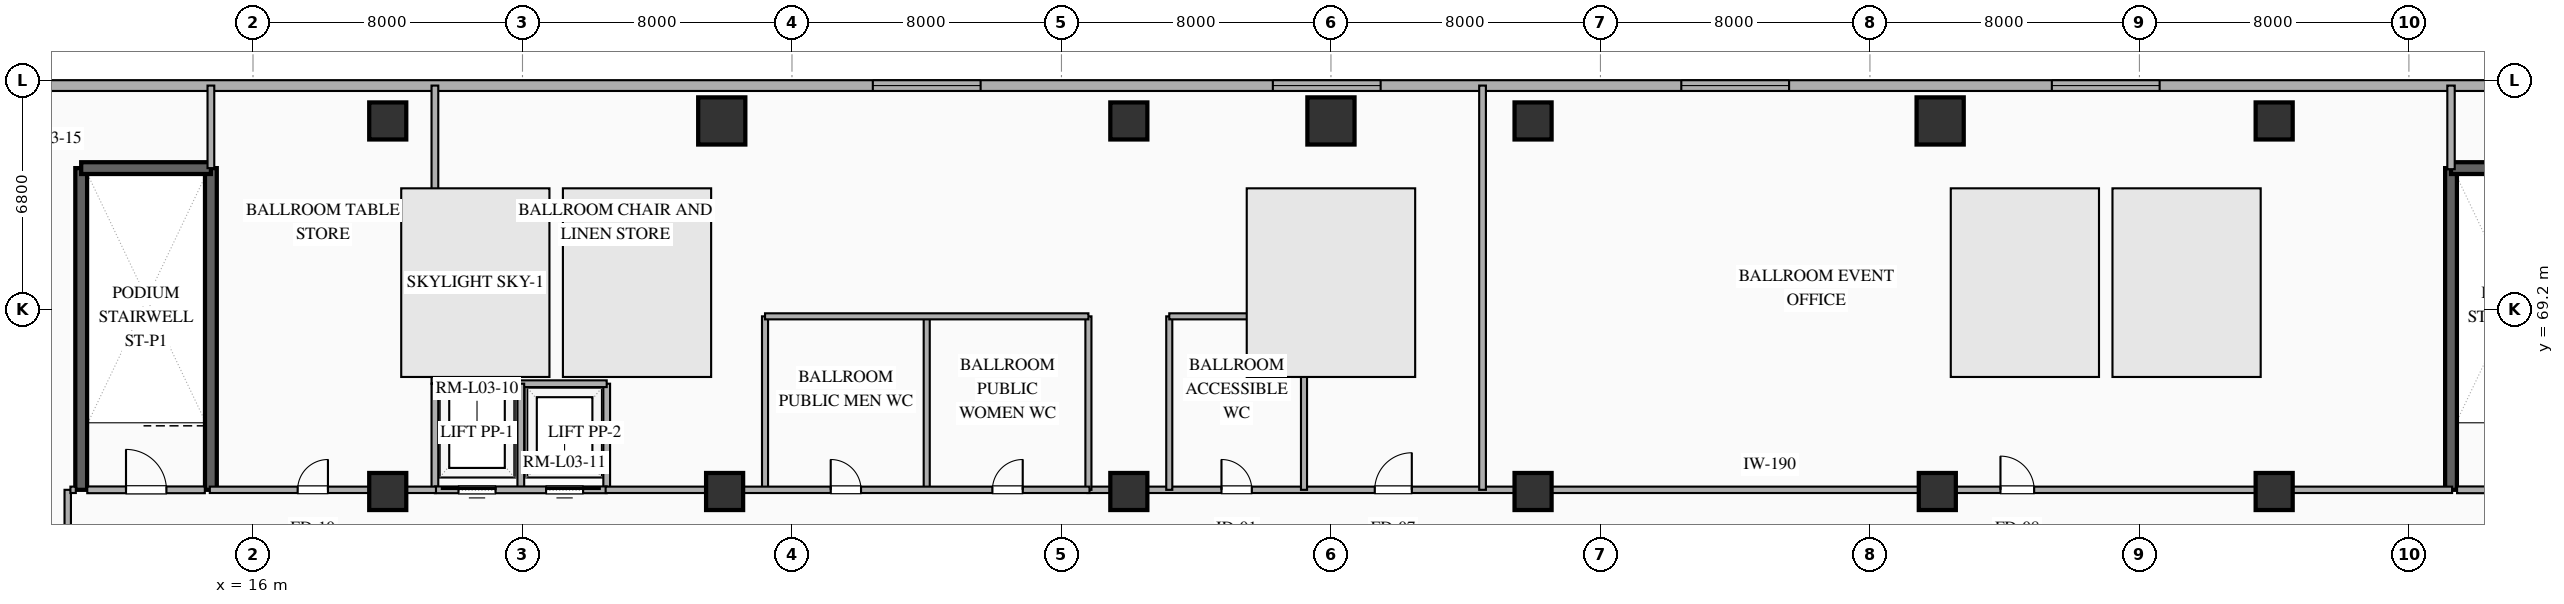
"""IFC4 building model, lengths in metres.
Left out: names, types, materials, properties, quantities, classifications, styles, units other than length and angle.
Written with IfcOpenShell. Run it as: python <this file> out.ifc"""

import sys

from ifc_helpers import new_model, si_unit, direction, frame, frame_2d, origin, origin_2d, place, context, subcontext, project, spatial, rectangle, extrude, element, fill, save


model = new_model("IFC4")
c1 = context("Model", 3, precision=1e-05, world=origin(), true_north=direction((0.0, 1.0)))
c2 = subcontext(c1, "Body", "Model", "MODEL_VIEW")
j1 = project(units=[si_unit("LENGTHUNIT", "METRE"), si_unit("PLANEANGLEUNIT", "RADIAN")], contexts=[c1])
p1 = place(None, origin())
s1 = spatial("IfcSite", under=j1, at=p1, CompositionType="ELEMENT")
p2 = place(p1, origin())
s2 = spatial("IfcBuilding", under=s1, at=p2, CompositionType="ELEMENT")
p3 = place(p2, frame((0.0, 0.0, 16.8)))
s3 = spatial("IfcBuildingStorey", under=s2, at=p3, CompositionType="ELEMENT", Elevation=16.8)
for number, where, z_axis, x_axis in (
    (1, (20.0, 74.8, 0.0), (0.0, 0.0, 1.0), (1.0, 0.0, 0.0)),
    (2, (20.0, 63.8, 0.0), (0.0, 0.0, 1.0), (1.0, 0.0, 0.0)),
    (3, (30.0, 63.8, 0.0), (0.0, 0.0, 1.0), (1.0, 0.0, 0.0)),
    (4, (42.0, 74.8, 0.0), (0.0, 0.0, 1.0), (1.0, 0.0, 0.0)),
    (5, (42.0, 63.8, 0.0), (0.0, 0.0, 1.0), (1.0, 0.0, 0.0)),
    (6, (54.0, 74.8, 0.0), (0.0, 0.0, 1.0), (1.0, 0.0, 0.0)),
    (7, (54.0, 63.8, 0.0), (0.0, 0.0, 1.0), (1.0, 0.0, 0.0)),
    (8, (66.0, 63.8, 0.0), (0.0, 0.0, 1.0), (1.0, 0.0, 0.0)),
    (9, (76.0, 74.8, 0.0), (0.0, 0.0, 1.0), (1.0, 0.0, 0.0)),
    (10, (76.0, 63.8, 0.0), (0.0, 0.0, 1.0), (1.0, 0.0, 0.0)),
):
    element("IfcColumn", number, at=place(p3, frame(where, z_axis=z_axis, x_axis=x_axis)), inside=s3, PredefinedType="COLUMN", context=c2, shape_type="SweptSolid", body=[
        extrude(rectangle(XDim=1.1, YDim=1.1, at=origin_2d()), origin(), (0.0, 0.0, 1.0), 5.05),
    ])
for number, where, z_axis, x_axis in (
    (11, (66.084, 74.8, 0.0), (0.0, 0.0, 1.0), (1.0, 0.0, 0.0)),
    (12, (48.0, 74.8, 0.0), (0.0, 0.0, 1.0), (1.0, 0.0, 0.0)),
    (13, (29.916, 74.8, 0.0), (0.0, 0.0, 1.0), (1.0, 0.0, 0.0)),
):
    element("IfcColumn", number, at=place(p3, frame(where, z_axis=z_axis, x_axis=x_axis)), inside=s3, PredefinedType="COLUMN", context=c2, shape_type="SweptSolid", body=[
        extrude(rectangle(XDim=1.4, YDim=1.4, at=origin_2d()), origin(), (0.0, 0.0, 1.0), 5.05),
    ])
for number, where, z_axis, x_axis in (
    (14, (10.9, 63.85, 0.0), (0.0, 0.0, 1.0), (0.0, 1.0, 0.0)),
    (15, (14.75, 63.85, 0.0), (0.0, 0.0, 1.0), (0.0, 1.0, 0.0)),
):
    element("IfcWall", number, at=place(p3, frame(where, z_axis=z_axis, x_axis=x_axis)), inside=s3, PredefinedType="SHEAR", context=c2, shape_type="SweptSolid", body=[
        extrude(rectangle(XDim=9.55, YDim=0.35, at=frame_2d((4.775, 0.0))), origin(), (0.0, 0.0, 1.0), 5.05),
    ])
p4 = place(p3, frame((10.9, 73.4, 0.0), z_axis=(0.0, 0.0, 1.0), x_axis=(1.0, 0.0, 0.0)))
e16 = element("IfcWall", 16, at=p4, inside=s3, PredefinedType="SHEAR", context=c2, shape_type="SweptSolid", body=[
    extrude(rectangle(XDim=3.85, YDim=0.35, at=frame_2d((1.925, 0.0))), origin(), (0.0, 0.0, 1.0), 5.05),
])
p5 = place(p3, frame((81.25, 63.85, 0.0), z_axis=(0.0, 0.0, 1.0), x_axis=(0.0, 1.0, 0.0)))
e17 = element("IfcWall", 17, at=p5, inside=s3, PredefinedType="SHEAR", context=c2, shape_type="SweptSolid", body=[
    extrude(rectangle(XDim=9.55, YDim=0.35, at=frame_2d((4.775, 0.0))), origin(), (0.0, 0.0, 1.0), 5.05),
])
p6 = place(p3, frame((81.25, 73.4, 0.0), z_axis=(0.0, 0.0, 1.0), x_axis=(1.0, 0.0, 0.0)))
e18 = element("IfcWall", 18, at=p6, inside=s3, PredefinedType="SHEAR", context=c2, shape_type="SweptSolid", body=[
    extrude(rectangle(XDim=3.8, YDim=0.35, at=frame_2d((1.9, 0.0))), origin(), (0.0, 0.0, 1.0), 5.05),
])
p7 = place(p3, frame((86.35, 75.85, 0.0), z_axis=(0.0, 0.0, 1.0), x_axis=(-1.0, 0.0, 0.0)))
e19 = element("IfcWall", 19, at=p7, inside=s3, PredefinedType="SOLIDWALL", context=c2, shape_type="SweptSolid", body=[
    extrude(rectangle(XDim=76.7, YDim=0.32, at=frame_2d((38.35, 0.0))), origin(), (0.0, 0.0, 1.0), 5.05),
])
p8 = place(p7, frame((13.75, 0.0, 0.9)))
e20 = element("IfcOpeningElement", 20, at=p8, cuts=e19, PredefinedType="OPENING", context=c2, shape_type="SweptSolid", body=[
    extrude(rectangle(XDim=3.2, YDim=3.95, at=frame_2d((1.6, 1.975))), frame((0.0, 0.17, 0.0), z_axis=(0.0, -1.0, 0.0), x_axis=(1.0, 0.0, 0.0)), (0.0, 0.0, 1.0), 0.34),
])
p9 = place(p7, frame((24.75, 0.0, 0.9)))
e21 = element("IfcOpeningElement", 21, at=p9, cuts=e19, PredefinedType="OPENING", context=c2, shape_type="SweptSolid", body=[
    extrude(rectangle(XDim=3.2, YDim=3.95, at=frame_2d((1.6, 1.975))), frame((0.0, 0.17, 0.0), z_axis=(0.0, -1.0, 0.0), x_axis=(1.0, 0.0, 0.0)), (0.0, 0.0, 1.0), 0.34),
])
p10 = place(p7, frame((36.875, 0.0, 0.9)))
e22 = element("IfcOpeningElement", 22, at=p10, cuts=e19, PredefinedType="OPENING", context=c2, shape_type="SweptSolid", body=[
    extrude(rectangle(XDim=3.2, YDim=3.95, at=frame_2d((1.6, 1.975))), frame((0.0, 0.17, 0.0), z_axis=(0.0, -1.0, 0.0), x_axis=(1.0, 0.0, 0.0)), (0.0, 0.0, 1.0), 0.34),
])
p11 = place(p7, frame((48.75, 0.0, 0.9)))
e23 = element("IfcOpeningElement", 23, at=p11, cuts=e19, PredefinedType="OPENING", context=c2, shape_type="SweptSolid", body=[
    extrude(rectangle(XDim=3.2, YDim=3.95, at=frame_2d((1.6, 1.975))), frame((0.0, 0.17, 0.0), z_axis=(0.0, -1.0, 0.0), x_axis=(1.0, 0.0, 0.0)), (0.0, 0.0, 1.0), 0.34),
])
p12 = place(p3, frame((11.08, 63.85, 0.0), z_axis=(0.0, 0.0, 1.0), x_axis=(1.0, 0.0, 0.0)))
e24 = element("IfcWall", 24, at=p12, inside=s3, PredefinedType="SOLIDWALL", context=c2, shape_type="SweptSolid", body=[
    extrude(rectangle(XDim=3.49, YDim=0.2, at=frame_2d((1.745, 0.0))), origin(), (0.0, 0.0, 1.0), 3.65),
])
p13 = place(p12, frame((1.15, 0.0, 0.0)))
e25 = element("IfcOpeningElement", 25, at=p13, cuts=e24, PredefinedType="OPENING", context=c2, shape_type="SweptSolid", body=[
    extrude(rectangle(XDim=1.2, YDim=2.15, at=frame_2d((0.6, 1.075))), frame((0.0, 0.11, 0.0), z_axis=(0.0, -1.0, 0.0), x_axis=(1.0, 0.0, 0.0)), (0.0, 0.0, 1.0), 0.22),
])
p14 = place(p3, frame((81.43, 63.85, 0.0), z_axis=(0.0, 0.0, 1.0), x_axis=(1.0, 0.0, 0.0)))
e26 = element("IfcWall", 26, at=p14, inside=s3, PredefinedType="SOLIDWALL", context=c2, shape_type="SweptSolid", body=[
    extrude(rectangle(XDim=3.44, YDim=0.2, at=frame_2d((1.72, 0.0))), origin(), (0.0, 0.0, 1.0), 3.65),
])
p15 = place(p14, frame((1.12, 0.0, 0.0)))
e27 = element("IfcOpeningElement", 27, at=p15, cuts=e26, PredefinedType="OPENING", context=c2, shape_type="SweptSolid", body=[
    extrude(rectangle(XDim=1.2, YDim=2.15, at=frame_2d((0.6, 1.075))), frame((0.0, 0.11, 0.0), z_axis=(0.0, -1.0, 0.0), x_axis=(1.0, 0.0, 0.0)), (0.0, 0.0, 1.0), 0.22),
])
for number, where, z_axis, x_axis in (
    (28, (21.4, 63.85, 0.0), (0.0, 0.0, 1.0), (0.0, 1.0, 0.0)),
    (29, (26.5, 63.85, 0.0), (0.0, 0.0, 1.0), (0.0, 1.0, 0.0)),
):
    element("IfcWall", number, at=place(p3, frame(where, z_axis=z_axis, x_axis=x_axis)), inside=s3, PredefinedType="SOLIDWALL", context=c2, shape_type="SweptSolid", body=[
        extrude(rectangle(XDim=3.15, YDim=0.2, at=frame_2d((1.575, 0.0))), origin(), (0.0, 0.0, 1.0), 3.65),
    ])
p16 = place(p3, frame((21.4, 67.0, 0.0), z_axis=(0.0, 0.0, 1.0), x_axis=(1.0, 0.0, 0.0)))
e30 = element("IfcWall", 30, at=p16, inside=s3, PredefinedType="SOLIDWALL", context=c2, shape_type="SweptSolid", body=[
    extrude(rectangle(XDim=5.1, YDim=0.2, at=frame_2d((2.55, 0.0))), origin(), (0.0, 0.0, 1.0), 3.65),
])
p17 = place(p3, frame((23.95, 63.85, 0.0), z_axis=(0.0, 0.0, 1.0), x_axis=(0.0, 1.0, 0.0)))
e31 = element("IfcWall", 31, at=p17, inside=s3, PredefinedType="SOLIDWALL", context=c2, shape_type="SweptSolid", body=[
    extrude(rectangle(XDim=3.15, YDim=0.2, at=frame_2d((1.575, 0.0))), origin(), (0.0, 0.0, 1.0), 3.65),
])
p18 = place(p3, frame((21.4, 63.85, 0.0), z_axis=(0.0, 0.0, 1.0), x_axis=(1.0, 0.0, 0.0)))
e32 = element("IfcWall", 32, at=p18, inside=s3, PredefinedType="SOLIDWALL", context=c2, shape_type="SweptSolid", body=[
    extrude(rectangle(XDim=5.1, YDim=0.2, at=frame_2d((2.55, 0.0))), origin(), (0.0, 0.0, 1.0), 3.65),
])
p19 = place(p18, frame((0.7, 0.0, 0.0)))
e33 = element("IfcOpeningElement", 33, at=p19, cuts=e32, PredefinedType="OPENING", context=c2, shape_type="SweptSolid", body=[
    extrude(rectangle(XDim=1.1, YDim=2.2, at=frame_2d((0.55, 1.1))), frame((0.0, 0.11, 0.0), z_axis=(0.0, -1.0, 0.0), x_axis=(1.0, 0.0, 0.0)), (0.0, 0.0, 1.0), 0.22),
])
p20 = place(p18, frame((3.3, 0.0, 0.0)))
e34 = element("IfcOpeningElement", 34, at=p20, cuts=e32, PredefinedType="OPENING", context=c2, shape_type="SweptSolid", body=[
    extrude(rectangle(XDim=1.1, YDim=2.2, at=frame_2d((0.55, 1.1))), frame((0.0, 0.11, 0.0), z_axis=(0.0, -1.0, 0.0), x_axis=(1.0, 0.0, 0.0)), (0.0, 0.0, 1.0), 0.22),
])
p21 = place(p3, frame((40.768, 63.85, 0.0), z_axis=(0.0, 0.0, 1.0), x_axis=(1.0, 0.0, 0.0)))
e35 = element("IfcWall", 35, at=p21, inside=s3, PredefinedType="PARTITIONING", context=c2, shape_type="SweptSolid", body=[
    extrude(rectangle(XDim=40.514, YDim=0.19, at=frame_2d((20.257, 0.0))), origin(), (0.0, 0.0, 1.0), 3.65),
])
p22 = place(p21, frame((27.107, 0.0, 0.0)))
e36 = element("IfcOpeningElement", 36, at=p22, cuts=e35, PredefinedType="OPENING", context=c2, shape_type="SweptSolid", body=[
    extrude(rectangle(XDim=1.0, YDim=2.2, at=frame_2d((0.5, 1.1))), frame((0.0, 0.105, 0.0), z_axis=(0.0, -1.0, 0.0), x_axis=(1.0, 0.0, 0.0)), (0.0, 0.0, 1.0), 0.21),
])
p23 = place(p21, frame((8.532, 0.0, 0.0)))
e37 = element("IfcOpeningElement", 37, at=p23, cuts=e35, PredefinedType="OPENING", context=c2, shape_type="SweptSolid", body=[
    extrude(rectangle(XDim=1.1, YDim=2.2, at=frame_2d((0.55, 1.1))), frame((0.0, 0.105, 0.0), z_axis=(0.0, -1.0, 0.0), x_axis=(1.0, 0.0, 0.0)), (0.0, 0.0, 1.0), 0.21),
])
p24 = place(p21, frame((3.982, 0.0, 0.0)))
e38 = element("IfcOpeningElement", 38, at=p24, cuts=e35, PredefinedType="OPENING", context=c2, shape_type="SweptSolid", body=[
    extrude(rectangle(XDim=0.9, YDim=2.1, at=frame_2d((0.45, 1.05))), frame((0.0, 0.105, 0.0), z_axis=(0.0, -1.0, 0.0), x_axis=(1.0, 0.0, 0.0)), (0.0, 0.0, 1.0), 0.21),
])
p25 = place(p3, frame((52.5, 75.85, 0.0), z_axis=(0.0, 0.0, 1.0), x_axis=(0.0, -1.0, 0.0)))
e39 = element("IfcWall", 39, at=p25, inside=s3, PredefinedType="PARTITIONING", context=c2, shape_type="SweptSolid", body=[
    extrude(rectangle(XDim=12.0, YDim=0.2, at=frame_2d((6.0, 0.0))), origin(), (0.0, 0.0, 1.0), 3.65),
])
p26 = place(p3, frame((21.4, 67.0, 0.0), z_axis=(0.0, 0.0, 1.0), x_axis=(0.0, 1.0, 0.0)))
e40 = element("IfcWall", 40, at=p26, inside=s3, PredefinedType="PARTITIONING", context=c2, shape_type="SweptSolid", body=[
    extrude(rectangle(XDim=8.85, YDim=0.2, at=frame_2d((4.425, 0.0))), origin(), (0.0, 0.0, 1.0), 3.65),
])
p27 = place(p3, frame((14.718, 63.85, 0.0), z_axis=(0.0, 0.0, 1.0), x_axis=(1.0, 0.0, 0.0)))
e41 = element("IfcWall", 41, at=p27, inside=s3, PredefinedType="PARTITIONING", context=c2, shape_type="SweptSolid", body=[
    extrude(rectangle(XDim=6.714, YDim=0.19, at=frame_2d((3.357, 0.0))), origin(), (0.0, 0.0, 1.0), 3.65),
])
p28 = place(p27, frame((2.607, 0.0, 0.0)))
e42 = element("IfcOpeningElement", 42, at=p28, cuts=e41, PredefinedType="OPENING", context=c2, shape_type="SweptSolid", body=[
    extrude(rectangle(XDim=0.9, YDim=2.15, at=frame_2d((0.45, 1.075))), frame((0.0, 0.105, 0.0), z_axis=(0.0, -1.0, 0.0), x_axis=(1.0, 0.0, 0.0)), (0.0, 0.0, 1.0), 0.21),
])
for number, where, z_axis, x_axis in (
    (43, (36.0, 69.0, 0.0), (0.0, 0.0, 1.0), (0.0, -1.0, 0.0)),
    (44, (31.2, 63.85, 0.0), (0.0, 0.0, 1.0), (0.0, 1.0, 0.0)),
    (45, (40.8, 69.0, 0.0), (0.0, 0.0, 1.0), (0.0, -1.0, 0.0)),
    (46, (43.2, 63.85, 0.0), (0.0, 0.0, 1.0), (0.0, 1.0, 0.0)),
    (47, (47.2, 69.0, 0.0), (0.0, 0.0, 1.0), (0.0, -1.0, 0.0)),
):
    element("IfcWall", number, at=place(p3, frame(where, z_axis=z_axis, x_axis=x_axis)), inside=s3, PredefinedType="PLUMBINGWALL", context=c2, shape_type="SweptSolid", body=[
        extrude(rectangle(XDim=5.15, YDim=0.18, at=frame_2d((2.575, 0.0))), origin(), (0.0, 0.0, 1.0), 3.65),
    ])
p29 = place(p3, frame((26.468, 63.85, 0.0), z_axis=(0.0, 0.0, 1.0), x_axis=(1.0, 0.0, 0.0)))
e48 = element("IfcWall", 48, at=p29, inside=s3, PredefinedType="PARTITIONING", context=c2, shape_type="SweptSolid", body=[
    extrude(rectangle(XDim=14.364, YDim=0.19, at=frame_2d((7.182, 0.0))), origin(), (0.0, 0.0, 1.0), 3.65),
])
p30 = place(p29, frame((6.682, 0.0, 0.0)))
e49 = element("IfcOpeningElement", 49, at=p30, cuts=e48, PredefinedType="OPENING", context=c2, shape_type="SweptSolid", body=[
    extrude(rectangle(XDim=0.9, YDim=2.1, at=frame_2d((0.45, 1.05))), frame((0.0, 0.105, 0.0), z_axis=(0.0, -1.0, 0.0), x_axis=(1.0, 0.0, 0.0)), (0.0, 0.0, 1.0), 0.21),
])
p31 = place(p29, frame((11.482, 0.0, 0.0)))
e50 = element("IfcOpeningElement", 50, at=p31, cuts=e48, PredefinedType="OPENING", context=c2, shape_type="SweptSolid", body=[
    extrude(rectangle(XDim=0.9, YDim=2.1, at=frame_2d((0.45, 1.05))), frame((0.0, 0.105, 0.0), z_axis=(0.0, -1.0, 0.0), x_axis=(1.0, 0.0, 0.0)), (0.0, 0.0, 1.0), 0.21),
])
p32 = place(p3, frame((31.2, 69.0, 0.0), z_axis=(0.0, 0.0, 1.0), x_axis=(1.0, 0.0, 0.0)))
e51 = element("IfcWall", 51, at=p32, inside=s3, PredefinedType="PLUMBINGWALL", context=c2, shape_type="SweptSolid", body=[
    extrude(rectangle(XDim=9.6, YDim=0.18, at=frame_2d((4.8, 0.0))), origin(), (0.0, 0.0, 1.0), 3.65),
])
p33 = place(p3, frame((43.2, 69.0, 0.0), z_axis=(0.0, 0.0, 1.0), x_axis=(1.0, 0.0, 0.0)))
e52 = element("IfcWall", 52, at=p33, inside=s3, PredefinedType="PLUMBINGWALL", context=c2, shape_type="SweptSolid", body=[
    extrude(rectangle(XDim=4.0, YDim=0.18, at=frame_2d((2.0, 0.0))), origin(), (0.0, 0.0, 1.0), 3.65),
])
p34 = place(p3, frame((10.5, 60.8, 0.0), z_axis=(0.0, 0.0, 1.0), x_axis=(0.0, 1.0, 0.0)))
e53 = element("IfcWall", 53, at=p34, inside=s3, PredefinedType="PARTITIONING", context=c2, shape_type="SweptSolid", body=[
    extrude(rectangle(XDim=3.05, YDim=0.19, at=frame_2d((1.525, 0.0))), origin(), (0.0, 0.0, 1.0), 3.65),
])
p35 = place(p34, frame((0.8, 0.0, 0.0)))
e54 = element("IfcOpeningElement", 54, at=p35, cuts=e53, PredefinedType="OPENING", context=c2, shape_type="SweptSolid", body=[
    extrude(rectangle(XDim=0.85, YDim=2.15, at=frame_2d((0.425, 1.075))), frame((0.0, 0.105, 0.0), z_axis=(0.0, -1.0, 0.0), x_axis=(1.0, 0.0, 0.0)), (0.0, 0.0, 1.0), 0.21),
])
p36 = place(p3, frame((81.25, 75.85, 0.0), z_axis=(0.0, 0.0, 1.0), x_axis=(0.0, -1.0, 0.0)))
e55 = element("IfcWall", 55, at=p36, inside=s3, PredefinedType="SOLIDWALL", context=c2, shape_type="SweptSolid", body=[
    extrude(rectangle(XDim=2.482, YDim=0.22, at=frame_2d((1.241, 0.0))), origin(), (0.0, 0.0, 1.0), 3.65),
])
p37 = place(p3, frame((14.75, 75.85, 0.0), z_axis=(0.0, 0.0, 1.0), x_axis=(0.0, -1.0, 0.0)))
e56 = element("IfcWall", 56, at=p37, inside=s3, PredefinedType="PARTITIONING", context=c2, shape_type="SweptSolid", body=[
    extrude(rectangle(XDim=2.45, YDim=0.2, at=frame_2d((1.225, 0.0))), origin(), (0.0, 0.0, 1.0), 3.65),
])
p38 = place(p3, frame((10.58, 63.85, 0.0), z_axis=(0.0, 0.0, 1.0), x_axis=(1.0, 0.0, 0.0)))
e57 = element("IfcWall", 57, at=p38, inside=s3, PredefinedType="PARTITIONING", context=c2, shape_type="SweptSolid", body=[
    extrude(rectangle(XDim=0.16, YDim=0.19, at=frame_2d((0.08, 0.0))), origin(), (0.0, 0.0, 1.0), 3.65),
])
p39 = place(p8, origin())
e58 = element("IfcWindow", 58, at=p39, inside=s3, PartitioningType="SINGLE_PANEL", PredefinedType="WINDOW", context=c2, shape_type="SweptSolid", body=[
    extrude(rectangle(XDim=3.2, YDim=3.95, at=frame_2d((1.6, 1.975))), frame((0.0, 0.03, 0.0), z_axis=(0.0, -1.0, 0.0), x_axis=(1.0, 0.0, 0.0)), (0.0, 0.0, 1.0), 0.06),
])
fill(e20, e58)
p40 = place(p9, origin())
e59 = element("IfcWindow", 59, at=p40, inside=s3, PartitioningType="SINGLE_PANEL", PredefinedType="WINDOW", context=c2, shape_type="SweptSolid", body=[
    extrude(rectangle(XDim=3.2, YDim=3.95, at=frame_2d((1.6, 1.975))), frame((0.0, 0.03, 0.0), z_axis=(0.0, -1.0, 0.0), x_axis=(1.0, 0.0, 0.0)), (0.0, 0.0, 1.0), 0.06),
])
fill(e21, e59)
p41 = place(p10, origin())
e60 = element("IfcWindow", 60, at=p41, inside=s3, PartitioningType="SINGLE_PANEL", PredefinedType="WINDOW", context=c2, shape_type="SweptSolid", body=[
    extrude(rectangle(XDim=3.2, YDim=3.95, at=frame_2d((1.6, 1.975))), frame((0.0, 0.03, 0.0), z_axis=(0.0, -1.0, 0.0), x_axis=(1.0, 0.0, 0.0)), (0.0, 0.0, 1.0), 0.06),
])
fill(e22, e60)
p42 = place(p11, origin())
e61 = element("IfcWindow", 61, at=p42, inside=s3, PartitioningType="SINGLE_PANEL", PredefinedType="WINDOW", context=c2, shape_type="SweptSolid", body=[
    extrude(rectangle(XDim=3.2, YDim=3.95, at=frame_2d((1.6, 1.975))), frame((0.0, 0.03, 0.0), z_axis=(0.0, -1.0, 0.0), x_axis=(1.0, 0.0, 0.0)), (0.0, 0.0, 1.0), 0.06),
])
fill(e23, e61)
p43 = place(p13, origin())
e62 = element("IfcDoor", 62, at=p43, inside=s3, OperationType="SINGLE_SWING_LEFT", PredefinedType="DOOR", context=c2, shape_type="SweptSolid", body=[
    extrude(rectangle(XDim=1.2, YDim=2.15, at=frame_2d((0.6, 1.075))), frame((0.0, 0.025, 0.0), z_axis=(0.0, -1.0, 0.0), x_axis=(1.0, 0.0, 0.0)), (0.0, 0.0, 1.0), 0.05),
])
fill(e25, e62)
p44 = place(p19, origin())
e63 = element("IfcDoor", 63, at=p44, inside=s3, OperationType="SLIDING_TO_LEFT", PredefinedType="DOOR", context=c2, shape_type="SweptSolid", body=[
    extrude(rectangle(XDim=1.1, YDim=2.2, at=frame_2d((0.55, 1.1))), frame((0.0, 0.025, 0.0), z_axis=(0.0, -1.0, 0.0), x_axis=(1.0, 0.0, 0.0)), (0.0, 0.0, 1.0), 0.05),
])
fill(e33, e63)
p45 = place(p20, origin())
e64 = element("IfcDoor", 64, at=p45, inside=s3, OperationType="SLIDING_TO_RIGHT", PredefinedType="DOOR", context=c2, shape_type="SweptSolid", body=[
    extrude(rectangle(XDim=1.1, YDim=2.2, at=frame_2d((0.55, 1.1))), frame((0.0, 0.025, 0.0), z_axis=(0.0, -1.0, 0.0), x_axis=(1.0, 0.0, 0.0)), (0.0, 0.0, 1.0), 0.05),
])
fill(e34, e64)
p46 = place(p22, origin())
e65 = element("IfcDoor", 65, at=p46, inside=s3, OperationType="SINGLE_SWING_LEFT", PredefinedType="DOOR", context=c2, shape_type="SweptSolid", body=[
    extrude(rectangle(XDim=1.0, YDim=2.2, at=frame_2d((0.5, 1.1))), frame((0.0, 0.025, 0.0), z_axis=(0.0, -1.0, 0.0), x_axis=(1.0, 0.0, 0.0)), (0.0, 0.0, 1.0), 0.05),
])
fill(e36, e65)
p47 = place(p23, origin())
e66 = element("IfcDoor", 66, at=p47, inside=s3, OperationType="SINGLE_SWING_RIGHT", PredefinedType="DOOR", context=c2, shape_type="SweptSolid", body=[
    extrude(rectangle(XDim=1.1, YDim=2.2, at=frame_2d((0.55, 1.1))), frame((0.0, 0.025, 0.0), z_axis=(0.0, -1.0, 0.0), x_axis=(1.0, 0.0, 0.0)), (0.0, 0.0, 1.0), 0.05),
])
fill(e37, e66)
p48 = place(p24, origin())
e67 = element("IfcDoor", 67, at=p48, inside=s3, OperationType="SINGLE_SWING_LEFT", PredefinedType="DOOR", context=c2, shape_type="SweptSolid", body=[
    extrude(rectangle(XDim=0.9, YDim=2.1, at=frame_2d((0.45, 1.05))), frame((0.0, 0.025, 0.0), z_axis=(0.0, -1.0, 0.0), x_axis=(1.0, 0.0, 0.0)), (0.0, 0.0, 1.0), 0.05),
])
fill(e38, e67)
p49 = place(p28, origin())
e68 = element("IfcDoor", 68, at=p49, inside=s3, OperationType="SINGLE_SWING_RIGHT", PredefinedType="DOOR", context=c2, shape_type="SweptSolid", body=[
    extrude(rectangle(XDim=0.9, YDim=2.15, at=frame_2d((0.45, 1.075))), frame((0.0, 0.025, 0.0), z_axis=(0.0, -1.0, 0.0), x_axis=(1.0, 0.0, 0.0)), (0.0, 0.0, 1.0), 0.05),
])
fill(e42, e68)
p50 = place(p30, origin())
e69 = element("IfcDoor", 69, at=p50, inside=s3, OperationType="SINGLE_SWING_LEFT", PredefinedType="DOOR", context=c2, shape_type="SweptSolid", body=[
    extrude(rectangle(XDim=0.9, YDim=2.1, at=frame_2d((0.45, 1.05))), frame((0.0, 0.025, 0.0), z_axis=(0.0, -1.0, 0.0), x_axis=(1.0, 0.0, 0.0)), (0.0, 0.0, 1.0), 0.05),
])
fill(e49, e69)
p51 = place(p31, origin())
e70 = element("IfcDoor", 70, at=p51, inside=s3, OperationType="SINGLE_SWING_RIGHT", PredefinedType="DOOR", context=c2, shape_type="SweptSolid", body=[
    extrude(rectangle(XDim=0.9, YDim=2.1, at=frame_2d((0.45, 1.05))), frame((0.0, 0.025, 0.0), z_axis=(0.0, -1.0, 0.0), x_axis=(1.0, 0.0, 0.0)), (0.0, 0.0, 1.0), 0.05),
])
fill(e50, e70)
save(model, sys.argv[1])
